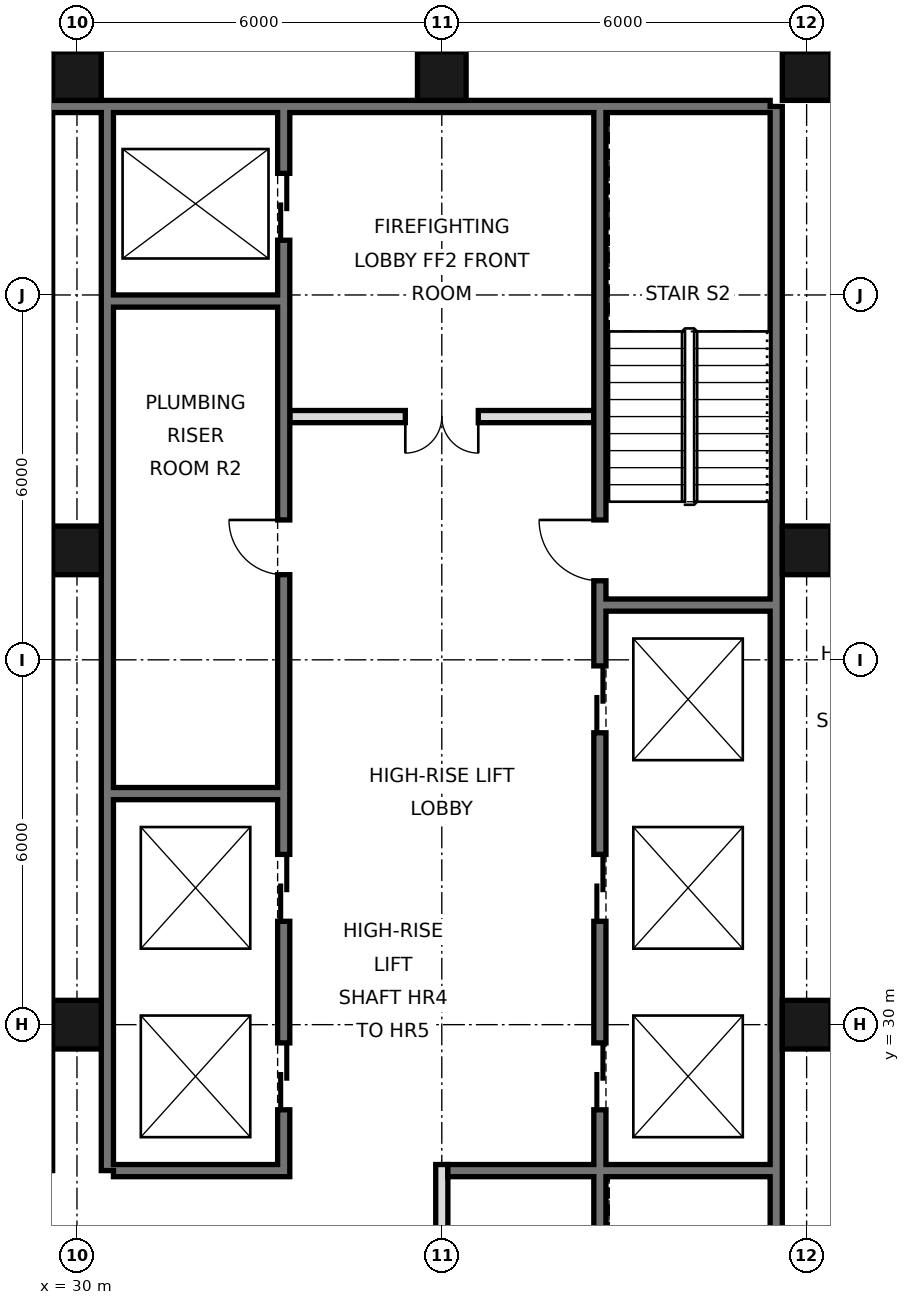
"""IFC4 building model, lengths in metres.
Left out: names, types, materials, properties, quantities, classifications, styles, units other than length and angle.
Written with IfcOpenShell. Run it as: python <this file> out.ifc"""

import sys

from ifc_helpers import new_model, si_unit, direction, frame, frame_2d, origin, origin_2d, place, context, subcontext, project, spatial, rectangle, hollow_rectangle, extrude, element, fill, save


model = new_model("IFC4")
c1 = context("Model", 3, precision=1e-05, world=origin(), true_north=direction((0.0, 1.0)))
c2 = subcontext(c1, "Body", "Model", "MODEL_VIEW")
j1 = project(units=[si_unit("LENGTHUNIT", "METRE"), si_unit("PLANEANGLEUNIT", "RADIAN")], contexts=[c1])
p1 = place(None, origin())
s1 = spatial("IfcSite", under=j1, at=p1, CompositionType="ELEMENT")
p2 = place(p1, origin())
s2 = spatial("IfcBuilding", under=s1, at=p2, CompositionType="ELEMENT")
p3 = place(p2, frame((0.0, 0.0, 250.4)))
s3 = spatial("IfcBuildingStorey", under=s2, at=p3, CompositionType="ELEMENT", Elevation=250.4)
for number, where, z_axis, x_axis in (
    (1, (30.0, 30.0, 0.0), (0.0, 0.0, 1.0), (1.0, 0.0, 0.0)),
    (2, (30.0, 37.8, 0.0), (0.0, 0.0, 1.0), (1.0, 0.0, 0.0)),
    (3, (30.0, 45.6, 0.0), (0.0, 0.0, 1.0), (1.0, 0.0, 0.0)),
    (4, (36.0, 45.6, 0.0), (0.0, 0.0, 1.0), (1.0, 0.0, 0.0)),
    (5, (42.0, 30.0, 0.0), (0.0, 0.0, 1.0), (1.0, 0.0, 0.0)),
    (6, (42.0, 37.8, 0.0), (0.0, 0.0, 1.0), (1.0, 0.0, 0.0)),
    (7, (42.0, 45.6, 0.0), (0.0, 0.0, 1.0), (1.0, 0.0, 0.0)),
):
    element("IfcColumn", number, at=place(p3, frame(where, z_axis=z_axis, x_axis=x_axis)), inside=s3, PredefinedType="COLUMN", context=c2, shape_type="SweptSolid", body=[
        extrude(hollow_rectangle(XDim=0.8, YDim=0.8, WallThickness=0.032, at=origin_2d()), origin(), (0.0, 0.0, 1.0), 3.6),
    ])
p4 = place(p3, frame((41.5, 21.6, 0.0), z_axis=(0.0, 0.0, 1.0), x_axis=(0.0, 1.0, 0.0)))
e8 = element("IfcWall", 8, at=p4, inside=s3, PredefinedType="SOLIDWALL", context=c2, shape_type="SweptSolid", body=[
    extrude(rectangle(XDim=23.5, YDim=0.2, at=frame_2d((11.75, 0.0))), origin(), (0.0, 0.0, 1.0), 3.42),
])
p5 = place(p3, frame((6.6, 45.1, 0.0), z_axis=(0.0, 0.0, 1.0), x_axis=(1.0, 0.0, 0.0)))
e9 = element("IfcWall", 9, at=p5, inside=s3, PredefinedType="SOLIDWALL", context=c2, shape_type="SweptSolid", body=[
    extrude(rectangle(XDim=34.8, YDim=0.2, at=frame_2d((17.4, 0.0))), origin(), (0.0, 0.0, 1.0), 3.42),
])
p6 = place(p3, frame((30.5, 27.6, 0.0), z_axis=(0.0, 0.0, 1.0), x_axis=(0.0, 1.0, 0.0)))
e10 = element("IfcWall", 10, at=p6, inside=s3, PredefinedType="SOLIDWALL", context=c2, shape_type="SweptSolid", body=[
    extrude(rectangle(XDim=17.5, YDim=0.2, at=frame_2d((8.75, 0.0))), origin(), (0.0, 0.0, 1.0), 3.42),
])
p7 = place(p3, frame((33.4, 27.5, 0.0), z_axis=(0.0, 0.0, 1.0), x_axis=(0.0, 1.0, 0.0)))
e11 = element("IfcWall", 11, at=p7, inside=s3, PredefinedType="SOLIDWALL", context=c2, shape_type="SweptSolid", body=[
    extrude(rectangle(XDim=17.5, YDim=0.2, at=frame_2d((8.75, 0.0))), origin(), (0.0, 0.0, 1.0), 3.42),
])
p8 = place(p7, frame((1.1, 0.0, 0.0)))
e12 = element("IfcOpeningElement", 12, at=p8, cuts=e11, PredefinedType="OPENING", context=c2, shape_type="SweptSolid", body=[
    extrude(rectangle(XDim=1.1, YDim=2.1, at=frame_2d((0.55, 1.05))), frame((0.0, 0.11, 0.0), z_axis=(0.0, -1.0, 0.0), x_axis=(1.0, 0.0, 0.0)), (0.0, 0.0, 1.0), 0.22),
])
p9 = place(p7, frame((4.2, 0.0, 0.0)))
e13 = element("IfcOpeningElement", 13, at=p9, cuts=e11, PredefinedType="OPENING", context=c2, shape_type="SweptSolid", body=[
    extrude(rectangle(XDim=1.1, YDim=2.1, at=frame_2d((0.55, 1.05))), frame((0.0, 0.11, 0.0), z_axis=(0.0, -1.0, 0.0), x_axis=(1.0, 0.0, 0.0)), (0.0, 0.0, 1.0), 0.22),
])
p10 = place(p7, frame((15.4, 0.0, 0.0)))
e14 = element("IfcOpeningElement", 14, at=p10, cuts=e11, PredefinedType="OPENING", context=c2, shape_type="SweptSolid", body=[
    extrude(rectangle(XDim=1.1, YDim=2.1, at=frame_2d((0.55, 1.05))), frame((0.0, 0.11, 0.0), z_axis=(0.0, -1.0, 0.0), x_axis=(1.0, 0.0, 0.0)), (0.0, 0.0, 1.0), 0.22),
])
p11 = place(p7, frame((9.9, 0.0, 0.0)))
e15 = element("IfcOpeningElement", 15, at=p11, cuts=e11, PredefinedType="OPENING", context=c2, shape_type="SweptSolid", body=[
    extrude(rectangle(XDim=0.9, YDim=2.1, at=frame_2d((0.45, 1.05))), frame((0.0, 0.11, 0.0), z_axis=(0.0, -1.0, 0.0), x_axis=(1.0, 0.0, 0.0)), (0.0, 0.0, 1.0), 0.22),
])
p12 = place(p3, frame((36.0, 21.6, 0.0), z_axis=(0.0, 0.0, 1.0), x_axis=(0.0, 1.0, 0.0)))
e16 = element("IfcWall", 16, at=p12, inside=s3, PredefinedType="PARTITIONING", context=c2, shape_type="SweptSolid", body=[
    extrude(rectangle(XDim=6.1, YDim=0.2, at=frame_2d((3.05, 0.0))), origin(), (0.0, 0.0, 1.0), 3.42),
])
p13 = place(p3, frame((38.6, 21.6, 0.0), z_axis=(0.0, 0.0, 1.0), x_axis=(0.0, 1.0, 0.0)))
e17 = element("IfcWall", 17, at=p13, inside=s3, PredefinedType="SOLIDWALL", context=c2, shape_type="SweptSolid", body=[
    extrude(rectangle(XDim=23.4, YDim=0.2, at=frame_2d((11.7, 0.0))), origin(), (0.0, 0.0, 1.0), 3.42),
])
p14 = place(p13, frame((7.0, 0.0, 0.0)))
e18 = element("IfcOpeningElement", 18, at=p14, cuts=e17, PredefinedType="OPENING", context=c2, shape_type="SweptSolid", body=[
    extrude(rectangle(XDim=1.1, YDim=2.1, at=frame_2d((0.55, 1.05))), frame((0.0, 0.11, 0.0), z_axis=(0.0, -1.0, 0.0), x_axis=(1.0, 0.0, 0.0)), (0.0, 0.0, 1.0), 0.22),
])
p15 = place(p13, frame((10.1, 0.0, 0.0)))
e19 = element("IfcOpeningElement", 19, at=p15, cuts=e17, PredefinedType="OPENING", context=c2, shape_type="SweptSolid", body=[
    extrude(rectangle(XDim=1.1, YDim=2.1, at=frame_2d((0.55, 1.05))), frame((0.0, 0.11, 0.0), z_axis=(0.0, -1.0, 0.0), x_axis=(1.0, 0.0, 0.0)), (0.0, 0.0, 1.0), 0.22),
])
p16 = place(p13, frame((13.2, 0.0, 0.0)))
e20 = element("IfcOpeningElement", 20, at=p16, cuts=e17, PredefinedType="OPENING", context=c2, shape_type="SweptSolid", body=[
    extrude(rectangle(XDim=1.1, YDim=2.1, at=frame_2d((0.55, 1.05))), frame((0.0, 0.11, 0.0), z_axis=(0.0, -1.0, 0.0), x_axis=(1.0, 0.0, 0.0)), (0.0, 0.0, 1.0), 0.22),
])
p17 = place(p13, frame((15.7, 0.0, 0.0)))
e21 = element("IfcOpeningElement", 21, at=p17, cuts=e17, PredefinedType="OPENING", context=c2, shape_type="SweptSolid", body=[
    extrude(rectangle(XDim=1.0, YDim=2.1, at=frame_2d((0.5, 1.05))), frame((0.0, 0.11, 0.0), z_axis=(0.0, -1.0, 0.0), x_axis=(1.0, 0.0, 0.0)), (0.0, 0.0, 1.0), 0.22),
])
p18 = place(p13, frame((0.175, 0.0, 0.0)))
e22 = element("IfcOpeningElement", 22, at=p18, cuts=e17, PredefinedType="OPENING", context=c2, shape_type="SweptSolid", body=[
    extrude(rectangle(XDim=0.9, YDim=2.1, at=frame_2d((0.45, 1.05))), frame((0.0, 0.11, 0.0), z_axis=(0.0, -1.0, 0.0), x_axis=(1.0, 0.0, 0.0)), (0.0, 0.0, 1.0), 0.22),
])
p19 = place(p3, frame((30.6, 27.6, 0.0), z_axis=(0.0, 0.0, 1.0), x_axis=(1.0, 0.0, 0.0)))
e23 = element("IfcWall", 23, at=p19, inside=s3, PredefinedType="SOLIDWALL", context=c2, shape_type="SweptSolid", body=[
    extrude(rectangle(XDim=2.7, YDim=0.2, at=frame_2d((1.35, 0.0))), origin(), (0.0, 0.0, 1.0), 3.42),
])
p20 = place(p3, frame((36.1, 27.6, 0.0), z_axis=(0.0, 0.0, 1.0), x_axis=(1.0, 0.0, 0.0)))
e24 = element("IfcWall", 24, at=p20, inside=s3, PredefinedType="SOLIDWALL", context=c2, shape_type="SweptSolid", body=[
    extrude(rectangle(XDim=5.3, YDim=0.2, at=frame_2d((2.65, 0.0))), origin(), (0.0, 0.0, 1.0), 3.42),
])
for number, where, z_axis, x_axis in (
    (25, (30.6, 33.8, 0.0), (0.0, 0.0, 1.0), (1.0, 0.0, 0.0)),
    (26, (38.7, 36.9, 0.0), (0.0, 0.0, 1.0), (1.0, 0.0, 0.0)),
):
    element("IfcWall", number, at=place(p3, frame(where, z_axis=z_axis, x_axis=x_axis)), inside=s3, PredefinedType="SOLIDWALL", context=c2, shape_type="SweptSolid", body=[
        extrude(rectangle(XDim=2.7, YDim=0.2, at=frame_2d((1.35, 0.0))), origin(), (0.0, 0.0, 1.0), 3.42),
    ])
p21 = place(p3, frame((33.5, 40.0, 0.0), z_axis=(0.0, 0.0, 1.0), x_axis=(1.0, 0.0, 0.0)))
e27 = element("IfcWall", 27, at=p21, inside=s3, PredefinedType="PARTITIONING", context=c2, shape_type="SweptSolid", body=[
    extrude(rectangle(XDim=5.0, YDim=0.2, at=frame_2d((2.5, 0.0))), origin(), (0.0, 0.0, 1.0), 3.42),
])
p22 = place(p21, frame((1.9, 0.0, 0.0)))
e28 = element("IfcOpeningElement", 28, at=p22, cuts=e27, PredefinedType="OPENING", context=c2, shape_type="SweptSolid", body=[
    extrude(rectangle(XDim=1.2, YDim=2.1, at=frame_2d((0.6, 1.05))), frame((0.0, 0.11, 0.0), z_axis=(0.0, -1.0, 0.0), x_axis=(1.0, 0.0, 0.0)), (0.0, 0.0, 1.0), 0.22),
])
p23 = place(p3, frame((30.6, 41.9, 0.0), z_axis=(0.0, 0.0, 1.0), x_axis=(1.0, 0.0, 0.0)))
e29 = element("IfcWall", 29, at=p23, inside=s3, PredefinedType="SOLIDWALL", context=c2, shape_type="SweptSolid", body=[
    extrude(rectangle(XDim=2.7, YDim=0.2, at=frame_2d((1.35, 0.0))), origin(), (0.0, 0.0, 1.0), 3.42),
])
p24 = place(p22, frame((1.2, 0.0, 0.0), z_axis=(0.0, 0.0, 1.0), x_axis=(-1.0, 0.0, 0.0)))
e30 = element("IfcDoor", 30, at=p24, inside=s3, OperationType="DOUBLE_DOOR_SINGLE_SWING", PredefinedType="DOOR", context=c2, shape_type="SweptSolid", body=[
    extrude(rectangle(XDim=1.2, YDim=2.1, at=frame_2d((0.6, 1.05))), frame((0.0, 0.025, 0.0), z_axis=(0.0, -1.0, 0.0), x_axis=(1.0, 0.0, 0.0)), (0.0, 0.0, 1.0), 0.05),
])
fill(e28, e30)
p25 = place(p14, origin())
e31 = element("IfcDoor", 31, at=p25, inside=s3, OperationType="DOUBLE_DOOR_SLIDING", PredefinedType="DOOR", context=c2, shape_type="SweptSolid", body=[
    extrude(rectangle(XDim=1.1, YDim=2.1, at=frame_2d((0.55, 1.05))), frame((0.0, 0.025, 0.0), z_axis=(0.0, -1.0, 0.0), x_axis=(1.0, 0.0, 0.0)), (0.0, 0.0, 1.0), 0.05),
])
fill(e18, e31)
p26 = place(p15, origin())
e32 = element("IfcDoor", 32, at=p26, inside=s3, OperationType="DOUBLE_DOOR_SLIDING", PredefinedType="DOOR", context=c2, shape_type="SweptSolid", body=[
    extrude(rectangle(XDim=1.1, YDim=2.1, at=frame_2d((0.55, 1.05))), frame((0.0, 0.025, 0.0), z_axis=(0.0, -1.0, 0.0), x_axis=(1.0, 0.0, 0.0)), (0.0, 0.0, 1.0), 0.05),
])
fill(e19, e32)
p27 = place(p16, origin())
e33 = element("IfcDoor", 33, at=p27, inside=s3, OperationType="DOUBLE_DOOR_SLIDING", PredefinedType="DOOR", context=c2, shape_type="SweptSolid", body=[
    extrude(rectangle(XDim=1.1, YDim=2.1, at=frame_2d((0.55, 1.05))), frame((0.0, 0.025, 0.0), z_axis=(0.0, -1.0, 0.0), x_axis=(1.0, 0.0, 0.0)), (0.0, 0.0, 1.0), 0.05),
])
fill(e20, e33)
p28 = place(p8, origin())
e34 = element("IfcDoor", 34, at=p28, inside=s3, OperationType="DOUBLE_DOOR_SLIDING", PredefinedType="DOOR", context=c2, shape_type="SweptSolid", body=[
    extrude(rectangle(XDim=1.1, YDim=2.1, at=frame_2d((0.55, 1.05))), frame((0.0, 0.025, 0.0), z_axis=(0.0, -1.0, 0.0), x_axis=(1.0, 0.0, 0.0)), (0.0, 0.0, 1.0), 0.05),
])
fill(e12, e34)
p29 = place(p9, origin())
e35 = element("IfcDoor", 35, at=p29, inside=s3, OperationType="DOUBLE_DOOR_SLIDING", PredefinedType="DOOR", context=c2, shape_type="SweptSolid", body=[
    extrude(rectangle(XDim=1.1, YDim=2.1, at=frame_2d((0.55, 1.05))), frame((0.0, 0.025, 0.0), z_axis=(0.0, -1.0, 0.0), x_axis=(1.0, 0.0, 0.0)), (0.0, 0.0, 1.0), 0.05),
])
fill(e13, e35)
p30 = place(p10, origin())
e36 = element("IfcDoor", 36, at=p30, inside=s3, OperationType="DOUBLE_DOOR_SLIDING", PredefinedType="DOOR", context=c2, shape_type="SweptSolid", body=[
    extrude(rectangle(XDim=1.1, YDim=2.1, at=frame_2d((0.55, 1.05))), frame((0.0, 0.025, 0.0), z_axis=(0.0, -1.0, 0.0), x_axis=(1.0, 0.0, 0.0)), (0.0, 0.0, 1.0), 0.05),
])
fill(e14, e36)
p31 = place(p17, frame((1.0, 0.0, 0.0), z_axis=(0.0, 0.0, 1.0), x_axis=(-1.0, 0.0, 0.0)))
e37 = element("IfcDoor", 37, at=p31, inside=s3, OperationType="SINGLE_SWING_LEFT", PredefinedType="DOOR", context=c2, shape_type="SweptSolid", body=[
    extrude(rectangle(XDim=1.0, YDim=2.1, at=frame_2d((0.5, 1.05))), frame((0.0, 0.025, 0.0), z_axis=(0.0, -1.0, 0.0), x_axis=(1.0, 0.0, 0.0)), (0.0, 0.0, 1.0), 0.05),
])
fill(e21, e37)
p32 = place(p11, frame((0.9, 0.0, 0.0), z_axis=(0.0, 0.0, 1.0), x_axis=(-1.0, 0.0, 0.0)))
e38 = element("IfcDoor", 38, at=p32, inside=s3, OperationType="SINGLE_SWING_LEFT", PredefinedType="DOOR", context=c2, shape_type="SweptSolid", body=[
    extrude(rectangle(XDim=0.9, YDim=2.1, at=frame_2d((0.45, 1.05))), frame((0.0, 0.025, 0.0), z_axis=(0.0, -1.0, 0.0), x_axis=(1.0, 0.0, 0.0)), (0.0, 0.0, 1.0), 0.05),
])
fill(e15, e38)
save(model, sys.argv[1])
